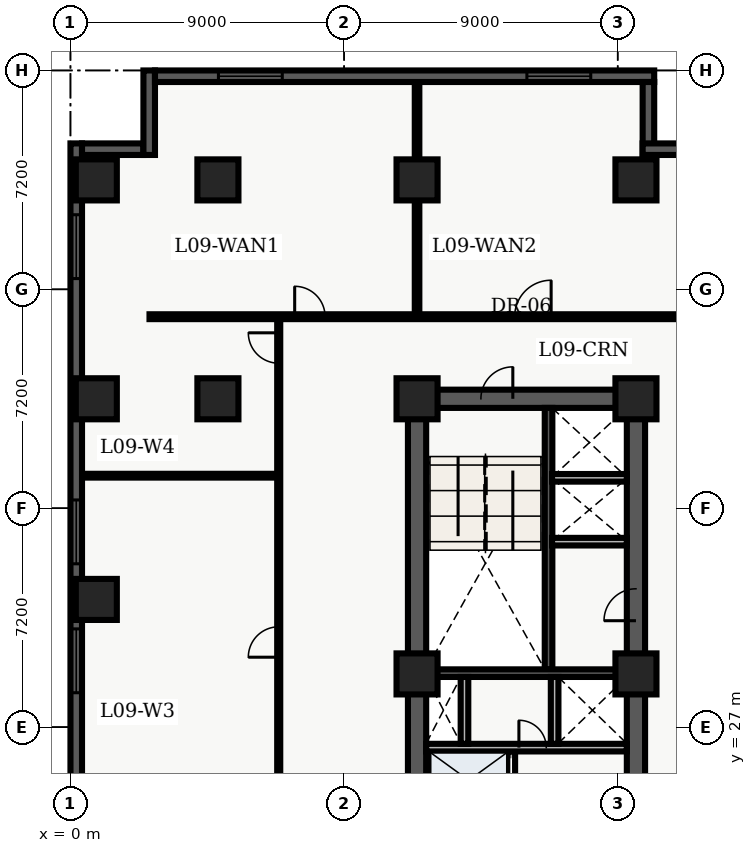
"""IFC4 building model, lengths in metres.
Left out: names, types, materials, properties, quantities, classifications, styles, units other than length and angle.
Written with IfcOpenShell. Run it as: python <this file> out.ifc"""

import sys

from ifc_helpers import new_model, entity, si_unit, converted_unit, direction, frame, origin_with_axes, origin_2d_with_axis, place, context, subcontext, project, spatial, polyline, rectangle, outline, extrude, element, fill, save


model = new_model("IFC4")
c1 = context("Model", 3, precision=1e-05, world=origin_with_axes(), true_north=direction((0.0, 1.0)))
c2 = subcontext(c1, "Body", "Model", "MODEL_VIEW")
j1 = project(units=[si_unit("LENGTHUNIT", "METRE"), converted_unit("PLANEANGLEUNIT", "DEGREE", entity("IfcPlaneAngleMeasure", 0.017), si_unit("PLANEANGLEUNIT", "RADIAN"), dimensions=[0, 0, 0, 0, 0, 0, 0])], contexts=[c1])
p1 = place(None, origin_with_axes())
s1 = spatial("IfcSite", under=j1, at=p1, CompositionType="ELEMENT")
p2 = place(p1, origin_with_axes())
s2 = spatial("IfcBuilding", under=s1, at=p2, CompositionType="ELEMENT")
p3 = place(p2, frame((0.0, 0.0, 40.5), z_axis=(0.0, 0.0, 1.0), x_axis=(1.0, 0.0, 0.0)))
s3 = spatial("IfcBuildingStorey", under=s2, at=p3, CompositionType="ELEMENT", Elevation=40.5)
p4 = place(p3, frame((11.4, 10.8, 0.0), z_axis=(0.0, 0.0, 1.0), x_axis=(0.0, 1.0, 0.0)))
e1 = element("IfcWall", 1, at=p4, inside=s3, PredefinedType="SHEAR", context=c2, shape_type="SweptSolid", body=[
    extrude(outline(polyline([(0.0, -0.3), (27.0, -0.3), (27.0, 0.3), (0.0, 0.3), (0.0, -0.3)])), origin_with_axes(), (0.0, 0.0, 1.0), 3.66),
])
p5 = place(p3, frame((11.4, 37.8, 0.0), z_axis=(0.0, 0.0, 1.0), x_axis=(1.0, 0.0, 0.0)))
e2 = element("IfcWall", 2, at=p5, inside=s3, PredefinedType="SHEAR", context=c2, shape_type="SweptSolid", body=[
    extrude(outline(polyline([(0.0, -0.3), (7.2, -0.3), (7.2, 0.3), (0.0, 0.3), (0.0, -0.3)])), origin_with_axes(), (0.0, 0.0, 1.0), 3.66),
])
p6 = place(p5, frame((2.625, 0.0, 0.0), z_axis=(0.0, 0.0, 1.0), x_axis=(1.0, 0.0, 0.0)))
e3 = element("IfcOpeningElement", 3, at=p6, cuts=e2, PredefinedType="OPENING", context=c2, shape_type="SweptSolid", body=[
    extrude(rectangle(XDim=1.05, YDim=0.62, at=origin_2d_with_axis()), origin_with_axes(), (0.0, 0.0, 1.0), 2.15),
])
p7 = place(p3, frame((18.6, 24.3, 0.0), z_axis=(0.0, 0.0, 1.0), x_axis=(0.0, 1.0, 0.0)))
e4 = element("IfcWall", 4, at=p7, inside=s3, PredefinedType="SHEAR", context=c2, shape_type="SweptSolid", body=[
    extrude(outline(polyline([(0.0, -0.3), (13.5, -0.3), (13.5, 0.3), (0.0, 0.3), (0.0, -0.3)])), origin_with_axes(), (0.0, 0.0, 1.0), 3.66),
])
p8 = place(p7, frame((6.725, 0.0, 0.0), z_axis=(0.0, 0.0, 1.0), x_axis=(1.0, 0.0, 0.0)))
e5 = element("IfcOpeningElement", 5, at=p8, cuts=e4, PredefinedType="OPENING", context=c2, shape_type="SweptSolid", body=[
    extrude(rectangle(XDim=1.05, YDim=0.62, at=origin_2d_with_axis()), origin_with_axes(), (0.0, 0.0, 1.0), 2.15),
])
p9 = place(p3, frame((15.725, 28.9, 0.0), z_axis=(0.0, 0.0, 1.0), x_axis=(0.0, 1.0, 0.0)))
e6 = element("IfcWall", 6, at=p9, inside=s3, PredefinedType="SHEAR", context=c2, shape_type="SweptSolid", body=[
    extrude(outline(polyline([(0.0, -0.125), (8.6, -0.125), (8.6, 0.125), (0.0, 0.125), (0.0, -0.125)])), origin_with_axes(), (0.0, 0.0, 1.0), 3.66),
])
p10 = place(p3, frame((11.7, 28.775, 0.0), z_axis=(0.0, 0.0, 1.0), x_axis=(1.0, 0.0, 0.0)))
e7 = element("IfcWall", 7, at=p10, inside=s3, PredefinedType="SHEAR", context=c2, shape_type="SweptSolid", body=[
    extrude(outline(polyline([(0.0, -0.125), (6.6, -0.125), (6.6, 0.125), (0.0, 0.125), (0.0, -0.125)])), origin_with_axes(), (0.0, 0.0, 1.0), 3.66),
])
p11 = place(p3, frame((14.5, 19.95, 0.0), z_axis=(0.0, 0.0, 1.0), x_axis=(0.0, 1.0, 0.0)))
e8 = element("IfcWall", 8, at=p11, inside=s3, PredefinedType="SOLIDWALL", context=c2, shape_type="SweptSolid", body=[
    extrude(outline(polyline([(0.0, -0.125), (6.25, -0.125), (6.25, 0.125), (0.0, 0.125), (0.0, -0.125)])), origin_with_axes(), (0.0, 0.0, 1.0), 2.7),
])
p12 = place(p11, frame((1.025, 0.0, 0.0), z_axis=(0.0, 0.0, 1.0), x_axis=(1.0, 0.0, 0.0)))
e9 = element("IfcOpeningElement", 9, at=p12, cuts=e8, PredefinedType="OPENING", context=c2, shape_type="SweptSolid", body=[
    extrude(rectangle(XDim=1.1, YDim=0.27, at=origin_2d_with_axis()), origin_with_axes(), (0.0, 0.0, 1.0), 2.15),
])
p13 = place(p11, frame((2.975, 0.0, 0.0), z_axis=(0.0, 0.0, 1.0), x_axis=(1.0, 0.0, 0.0)))
e10 = element("IfcOpeningElement", 10, at=p13, cuts=e8, PredefinedType="OPENING", context=c2, shape_type="SweptSolid", body=[
    extrude(rectangle(XDim=1.1, YDim=0.27, at=origin_2d_with_axis()), origin_with_axes(), (0.0, 0.0, 1.0), 2.15),
])
p14 = place(p11, frame((5.425, 0.0, 0.0), z_axis=(0.0, 0.0, 1.0), x_axis=(1.0, 0.0, 0.0)))
e11 = element("IfcOpeningElement", 11, at=p14, cuts=e8, PredefinedType="OPENING", context=c2, shape_type="SweptSolid", body=[
    extrude(rectangle(XDim=1.2, YDim=0.27, at=origin_2d_with_axis()), origin_with_axes(), (0.0, 0.0, 1.0), 2.15),
])
p15 = place(p3, frame((11.7, 26.325, 0.0), z_axis=(0.0, 0.0, 1.0), x_axis=(1.0, 0.0, 0.0)))
e12 = element("IfcWall", 12, at=p15, inside=s3, PredefinedType="SOLIDWALL", context=c2, shape_type="SweptSolid", body=[
    extrude(outline(polyline([(0.0, -0.125), (6.6, -0.125), (6.6, 0.125), (0.0, 0.125), (0.0, -0.125)])), origin_with_axes(), (0.0, 0.0, 1.0), 2.7),
])
p16 = place(p15, frame((3.5, 0.0, 0.0), z_axis=(0.0, 0.0, 1.0), x_axis=(1.0, 0.0, 0.0)))
e13 = element("IfcOpeningElement", 13, at=p16, cuts=e12, PredefinedType="OPENING", context=c2, shape_type="SweptSolid", body=[
    extrude(rectangle(XDim=0.9, YDim=0.27, at=origin_2d_with_axis()), origin_with_axes(), (0.0, 0.0, 1.0), 2.15),
])
for number, where, z_axis, x_axis in (
    (14, (12.96, 26.45, 0.0), (0.0, 0.0, 1.0), (0.0, 1.0, 0.0)),
    (15, (15.925, 26.45, 0.0), (0.0, 0.0, 1.0), (0.0, 1.0, 0.0)),
):
    element("IfcWall", number, at=place(p3, frame(where, z_axis=z_axis, x_axis=x_axis)), inside=s3, PredefinedType="SOLIDWALL", context=c2, shape_type="SweptSolid", body=[
        extrude(outline(polyline([(0.0, -0.125), (2.2, -0.125), (2.2, 0.125), (0.0, 0.125), (0.0, -0.125)])), origin_with_axes(), (0.0, 0.0, 1.0), 2.7),
    ])
for number, where, z_axis, x_axis in (
    (16, (11.4, 28.75, 0.0), (0.0, 0.0, 1.0), (1.0, 0.0, 0.0)),
    (17, (11.4, 37.8, 0.0), (0.0, 0.0, 1.0), (1.0, 0.0, 0.0)),
    (18, (11.4, 45.0, 0.0), (0.0, 0.0, 1.0), (1.0, 0.0, 0.0)),
    (19, (18.6, 28.75, 0.0), (0.0, 0.0, 1.0), (1.0, 0.0, 0.0)),
    (20, (18.6, 37.8, 0.0), (0.0, 0.0, 1.0), (1.0, 0.0, 0.0)),
    (21, (18.6, 45.0, 0.0), (0.0, 0.0, 1.0), (1.0, 0.0, 0.0)),
    (22, (4.85, 37.8, 0.0), (0.0, 0.0, 1.0), (1.0, 0.0, 0.0)),
    (23, (4.85, 45.0, 0.0), (0.0, 0.0, 1.0), (1.0, 0.0, 0.0)),
    (24, (0.85, 31.2, 0.0), (0.0, 0.0, 1.0), (1.0, 0.0, 0.0)),
    (25, (0.85, 37.8, 0.0), (0.0, 0.0, 1.0), (1.0, 0.0, 0.0)),
    (26, (0.85, 45.0, 0.0), (0.0, 0.0, 1.0), (1.0, 0.0, 0.0)),
):
    element("IfcColumn", number, at=place(p3, frame(where, z_axis=z_axis, x_axis=x_axis)), inside=s3, PredefinedType="COLUMN", context=c2, shape_type="SweptSolid", body=[
        extrude(rectangle(XDim=1.35, YDim=1.35, at=origin_2d_with_axis()), origin_with_axes(), (0.0, 0.0, 1.0), 3.9),
    ])
for number, where, z_axis, x_axis in (
    (27, (15.84, 33.1, 0.0), (0.0, 0.0, 1.0), (1.0, 0.0, 0.0)),
    (28, (15.84, 35.2, 0.0), (0.0, 0.0, 1.0), (1.0, 0.0, 0.0)),
):
    element("IfcWall", number, at=place(p3, frame(where, z_axis=z_axis, x_axis=x_axis)), inside=s3, PredefinedType="SOLIDWALL", context=c2, shape_type="SweptSolid", body=[
        extrude(outline(polyline([(0.0, -0.125), (2.46, -0.125), (2.46, 0.125), (0.0, 0.125), (0.0, -0.125)])), origin_with_axes(), (0.0, 0.0, 1.0), 2.7),
    ])
p17 = place(p3, frame((2.6, 40.5, 0.0), z_axis=(0.0, 0.0, 1.0), x_axis=(1.0, 0.0, 0.0)))
e29 = element("IfcWall", 29, at=p17, inside=s3, PredefinedType="PARTITIONING", context=c2, shape_type="SweptSolid", body=[
    extrude(outline(polyline([(0.0, -0.08), (18.65, -0.08), (18.65, 0.08), (0.0, 0.08), (0.0, -0.08)])), origin_with_axes(), (0.0, 0.0, 1.0), 2.7),
])
p18 = place(p17, frame((5.275, 0.0, 0.0), z_axis=(0.0, 0.0, 1.0), x_axis=(1.0, 0.0, 0.0)))
e30 = element("IfcOpeningElement", 30, at=p18, cuts=e29, PredefinedType="OPENING", context=c2, shape_type="SweptSolid", body=[
    extrude(rectangle(XDim=1.0, YDim=0.18, at=origin_2d_with_axis()), origin_with_axes(), (0.0, 0.0, 1.0), 2.15),
])
p19 = place(p17, frame((12.61, 0.0, 0.0), z_axis=(0.0, 0.0, 1.0), x_axis=(1.0, 0.0, 0.0)))
e31 = element("IfcOpeningElement", 31, at=p19, cuts=e29, PredefinedType="OPENING", context=c2, shape_type="SweptSolid", body=[
    extrude(rectangle(XDim=1.2, YDim=0.18, at=origin_2d_with_axis()), origin_with_axes(), (0.0, 0.0, 1.0), 2.2),
])
p20 = place(p3, frame((6.85, 7.8, 0.0), z_axis=(0.0, 0.0, 1.0), x_axis=(0.0, 1.0, 0.0)))
e32 = element("IfcWall", 32, at=p20, inside=s3, PredefinedType="PARTITIONING", context=c2, shape_type="SweptSolid", body=[
    extrude(outline(polyline([(0.0, -0.05), (32.7, -0.05), (32.7, 0.05), (0.0, 0.05), (0.0, -0.05)])), origin_with_axes(), (0.0, 0.0, 1.0), 2.7),
])
p21 = place(p20, frame((4.357, 0.0, 0.0), z_axis=(0.0, 0.0, 1.0), x_axis=(1.0, 0.0, 0.0)))
e33 = element("IfcOpeningElement", 33, at=p21, cuts=e32, PredefinedType="OPENING", context=c2, shape_type="SweptSolid", body=[
    extrude(rectangle(XDim=1.0, YDim=0.12, at=origin_2d_with_axis()), origin_with_axes(), (0.0, 0.0, 1.0), 2.15),
])
p22 = place(p20, frame((11.996, 0.0, 0.0), z_axis=(0.0, 0.0, 1.0), x_axis=(1.0, 0.0, 0.0)))
e34 = element("IfcOpeningElement", 34, at=p22, cuts=e32, PredefinedType="OPENING", context=c2, shape_type="SweptSolid", body=[
    extrude(rectangle(XDim=1.0, YDim=0.12, at=origin_2d_with_axis()), origin_with_axes(), (0.0, 0.0, 1.0), 2.15),
])
p23 = place(p20, frame((22.0, 0.0, 0.0), z_axis=(0.0, 0.0, 1.0), x_axis=(1.0, 0.0, 0.0)))
e35 = element("IfcOpeningElement", 35, at=p23, cuts=e32, PredefinedType="OPENING", context=c2, shape_type="SweptSolid", body=[
    extrude(rectangle(XDim=1.0, YDim=0.12, at=origin_2d_with_axis()), origin_with_axes(), (0.0, 0.0, 1.0), 2.15),
])
p24 = place(p20, frame((31.67, 0.0, 0.0), z_axis=(0.0, 0.0, 1.0), x_axis=(1.0, 0.0, 0.0)))
e36 = element("IfcOpeningElement", 36, at=p24, cuts=e32, PredefinedType="OPENING", context=c2, shape_type="SweptSolid", body=[
    extrude(rectangle(XDim=1.0, YDim=0.12, at=origin_2d_with_axis()), origin_with_axes(), (0.0, 0.0, 1.0), 2.15),
])
p25 = place(p3, frame((0.375, 35.27, 0.0), z_axis=(0.0, 0.0, 1.0), x_axis=(1.0, 0.0, 0.0)))
e37 = element("IfcWall", 37, at=p25, inside=s3, PredefinedType="PARTITIONING", context=c2, shape_type="SweptSolid", body=[
    extrude(outline(polyline([(0.0, -0.062), (6.355, -0.062), (6.355, 0.062), (0.0, 0.062), (0.0, -0.062)])), origin_with_axes(), (0.0, 0.0, 1.0), 2.7),
])
p26 = place(p3, frame((11.4, 40.6, 0.0), z_axis=(0.0, 0.0, 1.0), x_axis=(0.0, 1.0, 0.0)))
e38 = element("IfcWall", 38, at=p26, inside=s3, PredefinedType="PARTITIONING", context=c2, shape_type="SweptSolid", body=[
    extrude(outline(polyline([(0.0, -0.075), (7.64, -0.075), (7.64, 0.075), (0.0, 0.075), (0.0, -0.075)])), origin_with_axes(), (0.0, 0.0, 1.0), 2.7),
])
p27 = place(p3, frame((0.19, 2.78, 0.0), z_axis=(0.0, 0.0, 1.0), x_axis=(0.0, 1.0, 0.0)))
e39 = element("IfcWall", 39, at=p27, inside=s3, PredefinedType="SOLIDWALL", context=c2, shape_type="SweptSolid", body=[
    extrude(outline(polyline([(0.0, -0.19), (43.42, -0.19), (43.42, 0.19), (0.0, 0.19), (0.0, -0.19)])), origin_with_axes(), (0.0, 0.0, 1.0), 3.66),
])
p28 = place(p27, frame((2.946, 0.0, 0.45), z_axis=(0.0, 0.0, 1.0), x_axis=(1.0, 0.0, 0.0)))
e40 = element("IfcOpeningElement", 40, at=p28, cuts=e39, PredefinedType="OPENING", context=c2, shape_type="SweptSolid", body=[
    extrude(rectangle(XDim=2.1, YDim=0.4, at=origin_2d_with_axis()), origin_with_axes(), (0.0, 0.0, 1.0), 2.2),
])
p29 = place(p27, frame((17.469, 0.0, 0.45), z_axis=(0.0, 0.0, 1.0), x_axis=(1.0, 0.0, 0.0)))
e41 = element("IfcOpeningElement", 41, at=p29, cuts=e39, PredefinedType="OPENING", context=c2, shape_type="SweptSolid", body=[
    extrude(rectangle(XDim=2.1, YDim=0.4, at=origin_2d_with_axis()), origin_with_axes(), (0.0, 0.0, 1.0), 2.2),
])
p30 = place(p27, frame((26.401, 0.0, 0.45), z_axis=(0.0, 0.0, 1.0), x_axis=(1.0, 0.0, 0.0)))
e42 = element("IfcOpeningElement", 42, at=p30, cuts=e39, PredefinedType="OPENING", context=c2, shape_type="SweptSolid", body=[
    extrude(rectangle(XDim=2.1, YDim=0.4, at=origin_2d_with_axis()), origin_with_axes(), (0.0, 0.0, 1.0), 2.2),
])
p31 = place(p27, frame((30.642, 0.0, 0.45), z_axis=(0.0, 0.0, 1.0), x_axis=(1.0, 0.0, 0.0)))
e43 = element("IfcOpeningElement", 43, at=p31, cuts=e39, PredefinedType="OPENING", context=c2, shape_type="SweptSolid", body=[
    extrude(rectangle(XDim=2.1, YDim=0.4, at=origin_2d_with_axis()), origin_with_axes(), (0.0, 0.0, 1.0), 2.2),
])
p32 = place(p27, frame((40.024, 0.0, 0.45), z_axis=(0.0, 0.0, 1.0), x_axis=(1.0, 0.0, 0.0)))
e44 = element("IfcOpeningElement", 44, at=p32, cuts=e39, PredefinedType="OPENING", context=c2, shape_type="SweptSolid", body=[
    extrude(rectangle(XDim=2.1, YDim=0.4, at=origin_2d_with_axis()), origin_with_axes(), (0.0, 0.0, 1.0), 2.2),
])
p33 = place(p3, frame((0.38, 46.01, 0.0), z_axis=(0.0, 0.0, 1.0), x_axis=(1.0, 0.0, 0.0)))
e45 = element("IfcWall", 45, at=p33, inside=s3, PredefinedType="SOLIDWALL", context=c2, shape_type="SweptSolid", body=[
    extrude(outline(polyline([(0.0, -0.19), (2.02, -0.19), (2.02, 0.19), (0.0, 0.19), (0.0, -0.19)])), origin_with_axes(), (0.0, 0.0, 1.0), 3.66),
])
p34 = place(p3, frame((2.59, 45.82, 0.0), z_axis=(0.0, 0.0, 1.0), x_axis=(0.0, 1.0, 0.0)))
e46 = element("IfcWall", 46, at=p34, inside=s3, PredefinedType="SOLIDWALL", context=c2, shape_type="SweptSolid", body=[
    extrude(outline(polyline([(0.0, -0.19), (2.78, -0.19), (2.78, 0.19), (0.0, 0.19), (0.0, -0.19)])), origin_with_axes(), (0.0, 0.0, 1.0), 3.66),
])
p35 = place(p3, frame((2.78, 48.41, 0.0), z_axis=(0.0, 0.0, 1.0), x_axis=(1.0, 0.0, 0.0)))
e47 = element("IfcWall", 47, at=p35, inside=s3, PredefinedType="SOLIDWALL", context=c2, shape_type="SweptSolid", body=[
    extrude(outline(polyline([(0.0, -0.19), (16.42, -0.19), (16.42, 0.19), (0.0, 0.19), (0.0, -0.19)])), origin_with_axes(), (0.0, 0.0, 1.0), 3.66),
])
p36 = place(p35, frame((3.137, 0.0, 0.45), z_axis=(0.0, 0.0, 1.0), x_axis=(1.0, 0.0, 0.0)))
e48 = element("IfcOpeningElement", 48, at=p36, cuts=e47, PredefinedType="OPENING", context=c2, shape_type="SweptSolid", body=[
    extrude(rectangle(XDim=2.1, YDim=0.4, at=origin_2d_with_axis()), origin_with_axes(), (0.0, 0.0, 1.0), 2.2),
])
p37 = place(p35, frame((13.283, 0.0, 0.45), z_axis=(0.0, 0.0, 1.0), x_axis=(1.0, 0.0, 0.0)))
e49 = element("IfcOpeningElement", 49, at=p37, cuts=e47, PredefinedType="OPENING", context=c2, shape_type="SweptSolid", body=[
    extrude(rectangle(XDim=2.1, YDim=0.4, at=origin_2d_with_axis()), origin_with_axes(), (0.0, 0.0, 1.0), 2.2),
])
p38 = place(p3, frame((19.01, 48.22, 0.0), z_axis=(0.0, 0.0, 1.0), x_axis=(0.0, -1.0, 0.0)))
e50 = element("IfcWall", 50, at=p38, inside=s3, PredefinedType="SOLIDWALL", context=c2, shape_type="SweptSolid", body=[
    extrude(outline(polyline([(0.0, -0.19), (2.56, -0.19), (2.56, 0.19), (0.0, 0.19), (0.0, -0.19)])), origin_with_axes(), (0.0, 0.0, 1.0), 3.66),
])
p39 = place(p3, frame((18.82, 46.01, 0.0), z_axis=(0.0, 0.0, 1.0), x_axis=(1.0, 0.0, 0.0)))
e51 = element("IfcWall", 51, at=p39, inside=s3, PredefinedType="SOLIDWALL", context=c2, shape_type="SweptSolid", body=[
    extrude(outline(polyline([(0.0, -0.19), (2.78, -0.19), (2.78, 0.19), (0.0, 0.19), (0.0, -0.19)])), origin_with_axes(), (0.0, 0.0, 1.0), 3.66),
])
p40 = place(p11, frame((5.425, 0.0, 0.0), z_axis=(0.0, 0.0, 1.0), x_axis=(1.0, 0.0, 0.0)))
e52 = element("IfcDoor", 52, at=p40, inside=s3, OperationType="DOUBLE_DOOR_SLIDING", PredefinedType="DOOR", context=c2, shape_type="SweptSolid", body=[
    extrude(rectangle(XDim=1.2, YDim=0.09, at=origin_2d_with_axis()), origin_with_axes(), (0.0, 0.0, 1.0), 2.15),
])
fill(e11, e52)
p41 = place(p5, frame((2.625, 0.0, 0.0), z_axis=(0.0, 0.0, 1.0), x_axis=(1.0, 0.0, 0.0)))
e53 = element("IfcDoor", 53, at=p41, inside=s3, OperationType="SINGLE_SWING_RIGHT", PredefinedType="DOOR", context=c2, shape_type="SweptSolid", body=[
    extrude(rectangle(XDim=1.05, YDim=0.09, at=origin_2d_with_axis()), origin_with_axes(), (0.0, 0.0, 1.0), 2.15),
])
fill(e3, e53)
p42 = place(p15, frame((3.5, 0.0, 0.0), z_axis=(0.0, 0.0, 1.0), x_axis=(1.0, 0.0, 0.0)))
e54 = element("IfcDoor", 54, at=p42, inside=s3, OperationType="SINGLE_SWING_LEFT", PredefinedType="DOOR", context=c2, shape_type="SweptSolid", body=[
    extrude(rectangle(XDim=0.9, YDim=0.09, at=origin_2d_with_axis()), origin_with_axes(), (0.0, 0.0, 1.0), 2.15),
])
fill(e13, e54)
p43 = place(p7, frame((6.725, 0.0, 0.0), z_axis=(0.0, 0.0, 1.0), x_axis=(1.0, 0.0, 0.0)))
e55 = element("IfcDoor", 55, at=p43, inside=s3, OperationType="SINGLE_SWING_LEFT", PredefinedType="DOOR", context=c2, shape_type="SweptSolid", body=[
    extrude(rectangle(XDim=1.05, YDim=0.09, at=origin_2d_with_axis()), origin_with_axes(), (0.0, 0.0, 1.0), 2.15),
])
fill(e5, e55)
p44 = place(p20, frame((22.0, 0.0, 0.0), z_axis=(0.0, 0.0, 1.0), x_axis=(1.0, 0.0, 0.0)))
e56 = element("IfcDoor", 56, at=p44, inside=s3, OperationType="SINGLE_SWING_LEFT", PredefinedType="DOOR", context=c2, shape_type="SweptSolid", body=[
    extrude(rectangle(XDim=1.0, YDim=0.06, at=origin_2d_with_axis()), origin_with_axes(), (0.0, 0.0, 1.0), 2.15),
])
fill(e35, e56)
p45 = place(p20, frame((31.67, 0.0, 0.0), z_axis=(0.0, 0.0, 1.0), x_axis=(1.0, 0.0, 0.0)))
e57 = element("IfcDoor", 57, at=p45, inside=s3, OperationType="SINGLE_SWING_RIGHT", PredefinedType="DOOR", context=c2, shape_type="SweptSolid", body=[
    extrude(rectangle(XDim=1.0, YDim=0.06, at=origin_2d_with_axis()), origin_with_axes(), (0.0, 0.0, 1.0), 2.15),
])
fill(e36, e57)
p46 = place(p17, frame((5.275, 0.0, 0.0), z_axis=(0.0, 0.0, 1.0), x_axis=(1.0, 0.0, 0.0)))
e58 = element("IfcDoor", 58, at=p46, inside=s3, OperationType="SINGLE_SWING_LEFT", PredefinedType="DOOR", context=c2, shape_type="SweptSolid", body=[
    extrude(rectangle(XDim=1.0, YDim=0.09, at=origin_2d_with_axis()), origin_with_axes(), (0.0, 0.0, 1.0), 2.15),
])
fill(e30, e58)
p47 = place(p17, frame((12.61, 0.0, 0.0), z_axis=(0.0, 0.0, 1.0), x_axis=(1.0, 0.0, 0.0)))
e59 = element("IfcDoor", 59, at=p47, inside=s3, OperationType="SINGLE_SWING_RIGHT", PredefinedType="DOOR", context=c2, shape_type="SweptSolid", body=[
    extrude(rectangle(XDim=1.2, YDim=0.09, at=origin_2d_with_axis()), origin_with_axes(), (0.0, 0.0, 1.0), 2.2),
])
fill(e31, e59)
p48 = place(p27, frame((26.401, 0.0, 0.45), z_axis=(0.0, 0.0, 1.0), x_axis=(1.0, 0.0, 0.0)))
e60 = element("IfcWindow", 60, at=p48, inside=s3, PredefinedType="WINDOW", context=c2, shape_type="SweptSolid", body=[
    extrude(rectangle(XDim=2.1, YDim=0.09, at=origin_2d_with_axis()), origin_with_axes(), (0.0, 0.0, 1.0), 2.2),
])
fill(e42, e60)
p49 = place(p27, frame((30.642, 0.0, 0.45), z_axis=(0.0, 0.0, 1.0), x_axis=(1.0, 0.0, 0.0)))
e61 = element("IfcWindow", 61, at=p49, inside=s3, PredefinedType="WINDOW", context=c2, shape_type="SweptSolid", body=[
    extrude(rectangle(XDim=2.1, YDim=0.09, at=origin_2d_with_axis()), origin_with_axes(), (0.0, 0.0, 1.0), 2.2),
])
fill(e43, e61)
p50 = place(p27, frame((40.024, 0.0, 0.45), z_axis=(0.0, 0.0, 1.0), x_axis=(1.0, 0.0, 0.0)))
e62 = element("IfcWindow", 62, at=p50, inside=s3, PredefinedType="WINDOW", context=c2, shape_type="SweptSolid", body=[
    extrude(rectangle(XDim=2.1, YDim=0.09, at=origin_2d_with_axis()), origin_with_axes(), (0.0, 0.0, 1.0), 2.2),
])
fill(e44, e62)
p51 = place(p35, frame((3.137, 0.0, 0.45), z_axis=(0.0, 0.0, 1.0), x_axis=(1.0, 0.0, 0.0)))
e63 = element("IfcWindow", 63, at=p51, inside=s3, PredefinedType="WINDOW", context=c2, shape_type="SweptSolid", body=[
    extrude(rectangle(XDim=2.1, YDim=0.09, at=origin_2d_with_axis()), origin_with_axes(), (0.0, 0.0, 1.0), 2.2),
])
fill(e48, e63)
p52 = place(p35, frame((13.283, 0.0, 0.45), z_axis=(0.0, 0.0, 1.0), x_axis=(1.0, 0.0, 0.0)))
e64 = element("IfcWindow", 64, at=p52, inside=s3, PredefinedType="WINDOW", context=c2, shape_type="SweptSolid", body=[
    extrude(rectangle(XDim=2.1, YDim=0.09, at=origin_2d_with_axis()), origin_with_axes(), (0.0, 0.0, 1.0), 2.2),
])
fill(e49, e64)
save(model, sys.argv[1])
